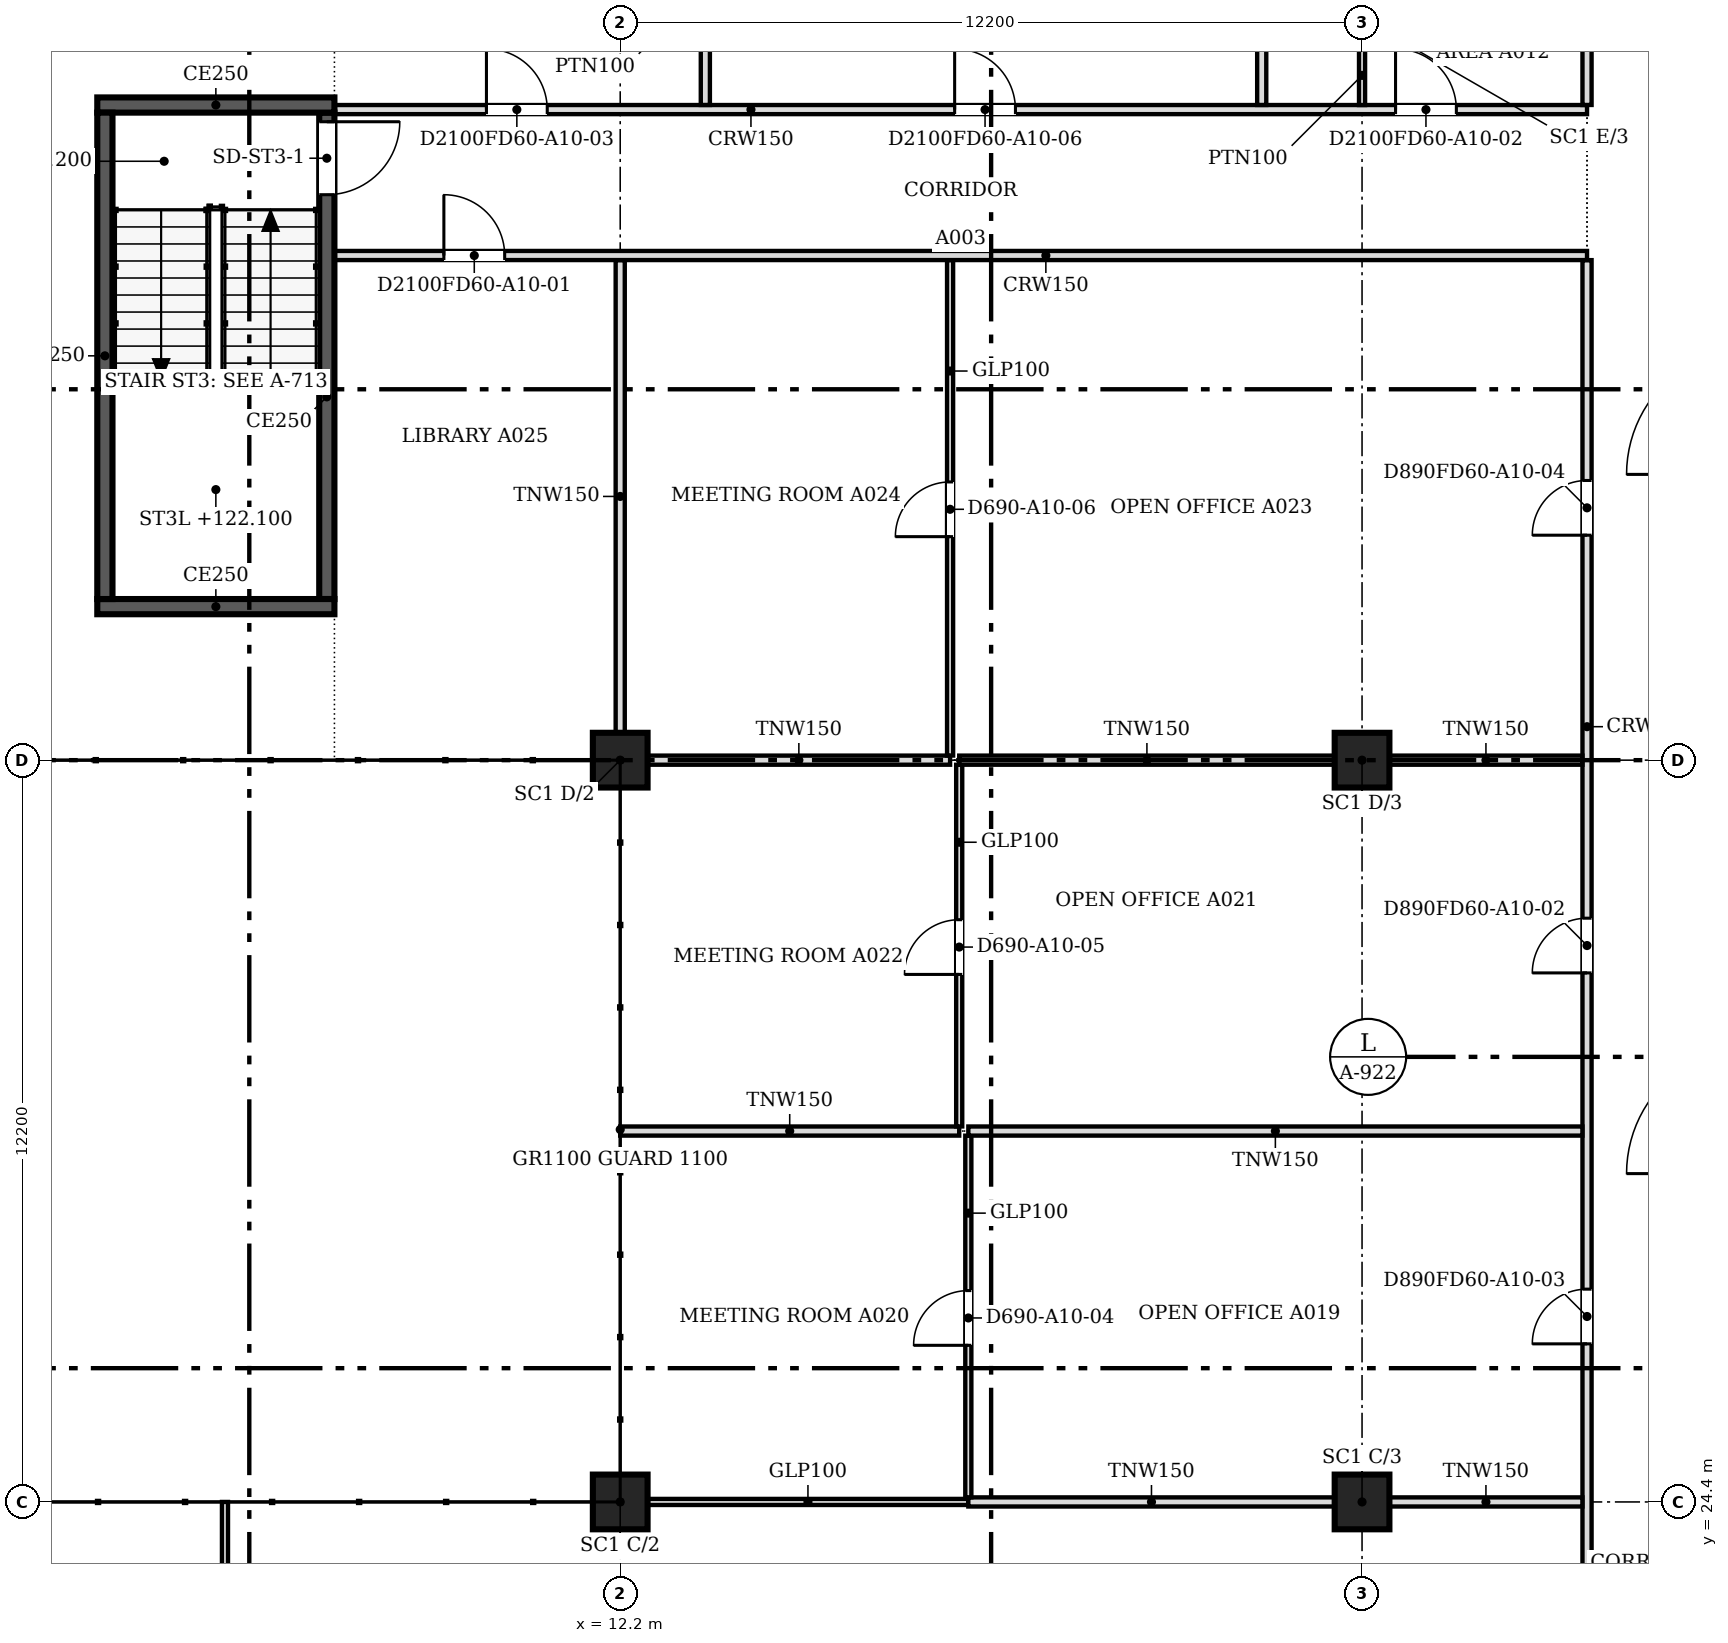
"""IFC4 building model, lengths in metres.
Left out: names, types, materials, properties, quantities, classifications, styles, units other than length and angle.
Written with IfcOpenShell. Run it as: python <this file> out.ifc"""

import sys

from ifc_helpers import new_model, si_unit, direction, frame, frame_2d, origin, origin_2d, place, context, subcontext, project, spatial, rectangle, extrude, source, transform, mapped, element, fill, save


model = new_model("IFC4")
c1 = context("Model", 3, precision=1e-05, world=origin(), true_north=direction((0.0, 1.0)))
c2 = subcontext(c1, "Body", "Model", "MODEL_VIEW")
j1 = project(units=[si_unit("LENGTHUNIT", "METRE"), si_unit("PLANEANGLEUNIT", "RADIAN")], contexts=[c1])
p1 = place(None, origin())
s1 = spatial("IfcSite", under=j1, at=p1, CompositionType="ELEMENT")
p2 = place(p1, origin())
s2 = spatial("IfcBuilding", under=s1, at=p2, CompositionType="ELEMENT")
p3 = place(p2, frame((0.0, 0.0, 120.2)))
s3 = spatial("IfcBuildingStorey", under=s2, at=p3, CompositionType="ELEMENT", Elevation=120.2)
for number, where, z_axis, x_axis in (
    (1, (12.2, 24.4, 0.0), (0.0, 0.0, 1.0), (1.0, 0.0, 0.0)),
    (2, (12.2, 36.6, 0.0), (0.0, 0.0, 1.0), (1.0, 0.0, 0.0)),
    (3, (24.4, 24.4, 0.0), (0.0, 0.0, 1.0), (1.0, 0.0, 0.0)),
    (4, (24.4, 36.6, 0.0), (0.0, 0.0, 1.0), (1.0, 0.0, 0.0)),
):
    element("IfcColumn", number, at=place(p3, frame(where, z_axis=z_axis, x_axis=x_axis)), inside=s3, PredefinedType="COLUMN", context=c2, shape_type="SweptSolid", body=[
        extrude(rectangle(XDim=0.9, YDim=0.9, at=origin_2d()), origin(), (0.0, 0.0, 1.0), 3.6),
    ])
p4 = place(p3, frame((7.5, 39.125, 0.0), z_axis=(0.0, 0.0, 1.0), x_axis=(-1.0, 0.0, 0.0)))
e5 = element("IfcWall", 5, at=p4, inside=s3, PredefinedType="SOLIDWALL", context=c2, shape_type="SweptSolid", body=[
    extrude(rectangle(XDim=3.9, YDim=0.25, at=frame_2d((1.95, 0.0))), origin(), (0.0, 0.0, 1.0), 3.8),
])
p5 = place(p3, frame((3.725, 39.25, 0.0), z_axis=(0.0, 0.0, 1.0), x_axis=(0.0, 1.0, 0.0)))
e6 = element("IfcWall", 6, at=p5, inside=s3, PredefinedType="SOLIDWALL", context=c2, shape_type="SweptSolid", body=[
    extrude(rectangle(XDim=8.0, YDim=0.25, at=frame_2d((4.0, 0.0))), origin(), (0.0, 0.0, 1.0), 3.8),
])
p6 = place(p3, frame((3.6, 47.375, 0.0), z_axis=(0.0, 0.0, 1.0), x_axis=(1.0, 0.0, 0.0)))
e7 = element("IfcWall", 7, at=p6, inside=s3, PredefinedType="SOLIDWALL", context=c2, shape_type="SweptSolid", body=[
    extrude(rectangle(XDim=3.9, YDim=0.25, at=frame_2d((1.95, 0.0))), origin(), (0.0, 0.0, 1.0), 3.8),
])
p7 = place(p3, frame((7.375, 47.25, 0.0), z_axis=(0.0, 0.0, 1.0), x_axis=(0.0, -1.0, 0.0)))
e8 = element("IfcWall", 8, at=p7, inside=s3, PredefinedType="SOLIDWALL", context=c2, shape_type="SweptSolid", body=[
    extrude(rectangle(XDim=8.0, YDim=0.25, at=frame_2d((4.0, 0.0))), origin(), (0.0, 0.0, 1.0), 3.8),
])
m1 = source(origin(), c2, "Body", "SweptSolid", [
    extrude(rectangle(XDim=1.2, YDim=2.1, at=frame_2d((0.6, 1.05))), frame((0.0, 0.135, 0.0), z_axis=(0.0, -1.0, 0.0), x_axis=(1.0, 0.0, 0.0)), (0.0, 0.0, 1.0), 0.27),
])
p8 = place(p7, frame((0.15, 0.0, 0.0)))
e9 = element("IfcOpeningElement", 9, at=p8, cuts=e8, PredefinedType="OPENING", context=c2, shape_type="MappedRepresentation", body=[
    mapped(m1, transform((0.0, 0.0, 0.0), scale=1.0)),
])
p9 = place(p3, frame((28.1, 18.8, 0.0), z_axis=(0.0, 0.0, 1.0), x_axis=(0.0, 1.0, 0.0)))
e10 = element("IfcWall", 10, at=p9, inside=s3, PredefinedType="PARTITIONING", context=c2, shape_type="SweptSolid", body=[
    extrude(rectangle(XDim=26.024, YDim=0.15, at=frame_2d((13.012, 0.0))), origin(), (0.0, 0.0, 1.0), 3.067),
])
m2 = source(origin(), c2, "Body", "SweptSolid", [
    extrude(rectangle(XDim=0.9, YDim=2.1, at=frame_2d((0.45, 1.05))), frame((0.0, 0.085, 0.0), z_axis=(0.0, -1.0, 0.0), x_axis=(1.0, 0.0, 0.0)), (0.0, 0.0, 1.0), 0.17),
])
p10 = place(p9, frame((1.1, 0.0, 0.0)))
e11 = element("IfcOpeningElement", 11, at=p10, cuts=e10, PredefinedType="OPENING", context=c2, shape_type="MappedRepresentation", body=[
    mapped(m2, transform((0.0, 0.0, 0.0), scale=1.0)),
])
p11 = place(p9, frame((14.301, 0.0, 0.0)))
e12 = element("IfcOpeningElement", 12, at=p11, cuts=e10, PredefinedType="OPENING", context=c2, shape_type="MappedRepresentation", body=[
    mapped(m2, transform((0.0, 0.0, 0.0), scale=1.0)),
])
p12 = place(p9, frame((8.2, 0.0, 0.0)))
e13 = element("IfcOpeningElement", 13, at=p12, cuts=e10, PredefinedType="OPENING", context=c2, shape_type="MappedRepresentation", body=[
    mapped(m2, transform((0.0, 0.0, 0.0), scale=1.0)),
])
p13 = place(p9, frame((21.5, 0.0, 0.0)))
e14 = element("IfcOpeningElement", 14, at=p13, cuts=e10, PredefinedType="OPENING", context=c2, shape_type="MappedRepresentation", body=[
    mapped(m2, transform((0.0, 0.0, 0.0), scale=1.0)),
])
p14 = place(p3, frame((5.7, 18.99, 0.0), z_axis=(0.0, 0.0, 1.0), x_axis=(0.0, 1.0, 0.0)))
e15 = element("IfcWall", 15, at=p14, inside=s3, PredefinedType="PARTITIONING", context=c2, shape_type="SweptSolid", body=[
    extrude(rectangle(XDim=5.41, YDim=0.1, at=frame_2d((2.705, 0.0))), origin(), (0.0, 0.0, 1.0), 3.067),
])
m3 = source(origin(), c2, "Body", "SweptSolid", [
    extrude(rectangle(XDim=0.9, YDim=2.1, at=frame_2d((0.45, 1.05))), frame((0.0, 0.06, 0.0), z_axis=(0.0, -1.0, 0.0), x_axis=(1.0, 0.0, 0.0)), (0.0, 0.0, 1.0), 0.12),
])
p15 = place(p14, frame((2.3, 0.0, 0.0)))
e16 = element("IfcOpeningElement", 16, at=p15, cuts=e15, PredefinedType="OPENING", context=c2, shape_type="MappedRepresentation", body=[
    mapped(m3, transform((0.0, 0.0, 0.0), scale=1.0)),
])
p16 = place(p3, frame((12.651, 24.4, 0.0), z_axis=(0.0, 0.0, 1.0), x_axis=(1.0, 0.0, 0.0)))
e17 = element("IfcWall", 17, at=p16, inside=s3, PredefinedType="PARTITIONING", context=c2, shape_type="SweptSolid", body=[
    extrude(rectangle(XDim=5.273, YDim=0.1, at=frame_2d((2.637, 0.0))), origin(), (0.0, 0.0, 1.0), 3.067),
])
p17 = place(p3, frame((17.925, 24.4, 0.0), z_axis=(0.0, 0.0, 1.0), x_axis=(1.0, 0.0, 0.0)))
e18 = element("IfcWall", 18, at=p17, inside=s3, PredefinedType="PARTITIONING", context=c2, shape_type="SweptSolid", body=[
    extrude(rectangle(XDim=6.024, YDim=0.15, at=frame_2d((3.012, 0.0))), origin(), (0.0, 0.0, 1.0), 3.067),
])
p18 = place(p3, frame((24.851, 24.4, 0.0), z_axis=(0.0, 0.0, 1.0), x_axis=(1.0, 0.0, 0.0)))
e19 = element("IfcWall", 19, at=p18, inside=s3, PredefinedType="PARTITIONING", context=c2, shape_type="SweptSolid", body=[
    extrude(rectangle(XDim=3.173, YDim=0.15, at=frame_2d((1.586, 0.0))), origin(), (0.0, 0.0, 1.0), 3.067),
])
p19 = place(p3, frame((17.925, 24.476, 0.0), z_axis=(0.0, 0.0, 1.0), x_axis=(0.0, 1.0, 0.0)))
e20 = element("IfcWall", 20, at=p19, inside=s3, PredefinedType="PARTITIONING", context=c2, shape_type="SweptSolid", body=[
    extrude(rectangle(XDim=5.948, YDim=0.1, at=frame_2d((2.974, 0.0))), origin(), (0.0, 0.0, 1.0), 3.067),
])
p20 = place(p19, frame((2.5, 0.0, 0.0)))
e21 = element("IfcOpeningElement", 21, at=p20, cuts=e20, PredefinedType="OPENING", context=c2, shape_type="MappedRepresentation", body=[
    mapped(m3, transform((0.0, 0.0, 0.0), scale=1.0)),
])
p21 = place(p3, frame((12.2, 30.5, 0.0), z_axis=(0.0, 0.0, 1.0), x_axis=(1.0, 0.0, 0.0)))
e22 = element("IfcWall", 22, at=p21, inside=s3, PredefinedType="PARTITIONING", context=c2, shape_type="SweptSolid", body=[
    extrude(rectangle(XDim=5.575, YDim=0.15, at=frame_2d((2.788, 0.0))), origin(), (0.0, 0.0, 1.0), 3.067),
])
p22 = place(p3, frame((17.925, 30.5, 0.0), z_axis=(0.0, 0.0, 1.0), x_axis=(1.0, 0.0, 0.0)))
e23 = element("IfcWall", 23, at=p22, inside=s3, PredefinedType="PARTITIONING", context=c2, shape_type="SweptSolid", body=[
    extrude(rectangle(XDim=10.099, YDim=0.15, at=frame_2d((5.049, 0.0))), origin(), (0.0, 0.0, 1.0), 3.067),
])
p23 = place(p3, frame((17.775, 30.576, 0.0), z_axis=(0.0, 0.0, 1.0), x_axis=(0.0, 1.0, 0.0)))
e24 = element("IfcWall", 24, at=p23, inside=s3, PredefinedType="PARTITIONING", context=c2, shape_type="SweptSolid", body=[
    extrude(rectangle(XDim=5.948, YDim=0.1, at=frame_2d((2.974, 0.0))), origin(), (0.0, 0.0, 1.0), 3.067),
])
p24 = place(p23, frame((2.5, 0.0, 0.0)))
e25 = element("IfcOpeningElement", 25, at=p24, cuts=e24, PredefinedType="OPENING", context=c2, shape_type="MappedRepresentation", body=[
    mapped(m3, transform((0.0, 0.0, 0.0), scale=1.0)),
])
p25 = place(p3, frame((12.651, 36.6, 0.0), z_axis=(0.0, 0.0, 1.0), x_axis=(1.0, 0.0, 0.0)))
e26 = element("IfcWall", 26, at=p25, inside=s3, PredefinedType="PARTITIONING", context=c2, shape_type="SweptSolid", body=[
    extrude(rectangle(XDim=4.974, YDim=0.15, at=frame_2d((2.487, 0.0))), origin(), (0.0, 0.0, 1.0), 3.067),
])
p26 = place(p3, frame((17.775, 36.6, 0.0), z_axis=(0.0, 0.0, 1.0), x_axis=(1.0, 0.0, 0.0)))
e27 = element("IfcWall", 27, at=p26, inside=s3, PredefinedType="PARTITIONING", context=c2, shape_type="SweptSolid", body=[
    extrude(rectangle(XDim=6.174, YDim=0.15, at=frame_2d((3.087, 0.0))), origin(), (0.0, 0.0, 1.0), 3.067),
])
p27 = place(p3, frame((24.851, 36.6, 0.0), z_axis=(0.0, 0.0, 1.0), x_axis=(1.0, 0.0, 0.0)))
e28 = element("IfcWall", 28, at=p27, inside=s3, PredefinedType="PARTITIONING", context=c2, shape_type="SweptSolid", body=[
    extrude(rectangle(XDim=3.173, YDim=0.15, at=frame_2d((1.586, 0.0))), origin(), (0.0, 0.0, 1.0), 3.067),
])
p28 = place(p3, frame((17.625, 36.676, 0.0), z_axis=(0.0, 0.0, 1.0), x_axis=(0.0, 1.0, 0.0)))
e29 = element("IfcWall", 29, at=p28, inside=s3, PredefinedType="PARTITIONING", context=c2, shape_type="SweptSolid", body=[
    extrude(rectangle(XDim=8.148, YDim=0.1, at=frame_2d((4.074, 0.0))), origin(), (0.0, 0.0, 1.0), 3.067),
])
p29 = place(p28, frame((3.6, 0.0, 0.0)))
e30 = element("IfcOpeningElement", 30, at=p29, cuts=e29, PredefinedType="OPENING", context=c2, shape_type="MappedRepresentation", body=[
    mapped(m3, transform((0.0, 0.0, 0.0), scale=1.0)),
])
p30 = place(p3, frame((12.2, 37.051, 0.0), z_axis=(0.0, 0.0, 1.0), x_axis=(0.0, 1.0, 0.0)))
e31 = element("IfcWall", 31, at=p30, inside=s3, PredefinedType="PARTITIONING", context=c2, shape_type="SweptSolid", body=[
    extrude(rectangle(XDim=7.773, YDim=0.15, at=frame_2d((3.886, 0.0))), origin(), (0.0, 0.0, 1.0), 3.067),
])
p31 = place(p3, frame((28.1, 44.9, 0.0), z_axis=(0.0, 0.0, 1.0), x_axis=(-1.0, 0.0, 0.0)))
e32 = element("IfcWall", 32, at=p31, inside=s3, PredefinedType="PARTITIONING", context=c2, shape_type="SweptSolid", body=[
    extrude(rectangle(XDim=20.6, YDim=0.15, at=frame_2d((10.3, 0.0))), origin(), (0.0, 0.0, 1.0), 3.067),
])
m4 = source(origin(), c2, "Body", "SweptSolid", [
    extrude(rectangle(XDim=1.0, YDim=2.1, at=frame_2d((0.5, 1.05))), frame((0.0, 0.085, 0.0), z_axis=(0.0, -1.0, 0.0), x_axis=(1.0, 0.0, 0.0)), (0.0, 0.0, 1.0), 0.17),
])
p32 = place(p31, frame((17.8, 0.0, 0.0)))
e33 = element("IfcOpeningElement", 33, at=p32, cuts=e32, PredefinedType="OPENING", context=c2, shape_type="MappedRepresentation", body=[
    mapped(m4, transform((0.0, 0.0, 0.0), scale=1.0)),
])
p33 = place(p3, frame((7.5, 47.3, 0.0), z_axis=(0.0, 0.0, 1.0), x_axis=(1.0, 0.0, 0.0)))
e34 = element("IfcWall", 34, at=p33, inside=s3, PredefinedType="PARTITIONING", context=c2, shape_type="SweptSolid", body=[
    extrude(rectangle(XDim=20.6, YDim=0.15, at=frame_2d((10.3, 0.0))), origin(), (0.0, 0.0, 1.0), 3.067),
])
p34 = place(p33, frame((17.451, 0.0, 0.0)))
e35 = element("IfcOpeningElement", 35, at=p34, cuts=e34, PredefinedType="OPENING", context=c2, shape_type="MappedRepresentation", body=[
    mapped(m4, transform((0.0, 0.0, 0.0), scale=1.0)),
])
p35 = place(p33, frame((2.5, 0.0, 0.0)))
e36 = element("IfcOpeningElement", 36, at=p35, cuts=e34, PredefinedType="OPENING", context=c2, shape_type="MappedRepresentation", body=[
    mapped(m4, transform((0.0, 0.0, 0.0), scale=1.0)),
])
p36 = place(p33, frame((10.2, 0.0, 0.0)))
e37 = element("IfcOpeningElement", 37, at=p36, cuts=e34, PredefinedType="OPENING", context=c2, shape_type="MappedRepresentation", body=[
    mapped(m4, transform((0.0, 0.0, 0.0), scale=1.0)),
])
p37 = place(p3, frame((13.6, 47.376, 0.0), z_axis=(0.0, 0.0, 1.0), x_axis=(0.0, 1.0, 0.0)))
e38 = element("IfcWall", 38, at=p37, inside=s3, PredefinedType="PARTITIONING", context=c2, shape_type="SweptSolid", body=[
    extrude(rectangle(XDim=3.498, YDim=0.15, at=frame_2d((1.749, 0.0))), origin(), (0.0, 0.0, 1.0), 3.067),
])
p38 = place(p3, frame((22.75, 47.376, 0.0), z_axis=(0.0, 0.0, 1.0), x_axis=(0.0, 1.0, 0.0)))
e39 = element("IfcWall", 39, at=p38, inside=s3, PredefinedType="PARTITIONING", context=c2, shape_type="SweptSolid", body=[
    extrude(rectangle(XDim=2.948, YDim=0.15, at=frame_2d((1.474, 0.0))), origin(), (0.0, 0.0, 1.0), 3.067),
])
p39 = place(p3, frame((28.1, 47.376, 0.0), z_axis=(0.0, 0.0, 1.0), x_axis=(0.0, 1.0, 0.0)))
e40 = element("IfcWall", 40, at=p39, inside=s3, PredefinedType="PARTITIONING", context=c2, shape_type="SweptSolid", body=[
    extrude(rectangle(XDim=3.748, YDim=0.15, at=frame_2d((1.874, 0.0))), origin(), (0.0, 0.0, 1.0), 3.067),
])
p40 = place(p3, frame((24.4, 48.35, 0.0), z_axis=(0.0, 0.0, 1.0), x_axis=(0.0, -1.0, 0.0)))
e41 = element("IfcWall", 41, at=p40, inside=s3, PredefinedType="PARTITIONING", context=c2, shape_type="SweptSolid", body=[
    extrude(rectangle(XDim=0.975, YDim=0.1, at=frame_2d((0.488, 0.0))), origin(), (0.0, 0.0, 1.0), 3.067),
])
m5 = source(origin(), c2, "Body", "SweptSolid", [
    extrude(rectangle(XDim=1.2, YDim=2.1, at=frame_2d((0.6, 1.05))), frame((0.0, 0.025, 0.0), z_axis=(0.0, -1.0, 0.0), x_axis=(1.0, 0.0, 0.0)), (0.0, 0.0, 1.0), 0.05),
])
p41 = place(p8, origin())
e42 = element("IfcDoor", 42, at=p41, inside=s3, OperationType="SINGLE_SWING_LEFT", PredefinedType="DOOR", context=c2, shape_type="MappedRepresentation", body=[
    mapped(m5, transform((0.0, 0.0, 0.0), scale=1.0)),
])
fill(e9, e42)
m6 = source(origin(), c2, "Body", "SweptSolid", [
    extrude(rectangle(XDim=1.0, YDim=2.1, at=frame_2d((0.5, 1.05))), frame((0.0, 0.025, 0.0), z_axis=(0.0, -1.0, 0.0), x_axis=(1.0, 0.0, 0.0)), (0.0, 0.0, 1.0), 0.05),
])
p42 = place(p32, origin())
e43 = element("IfcDoor", 43, at=p42, inside=s3, OperationType="SINGLE_SWING_RIGHT", PredefinedType="DOOR", context=c2, shape_type="MappedRepresentation", body=[
    mapped(m6, transform((0.0, 0.0, 0.0), scale=1.0)),
])
fill(e33, e43)
p43 = place(p34, origin())
e44 = element("IfcDoor", 44, at=p43, inside=s3, OperationType="SINGLE_SWING_LEFT", PredefinedType="DOOR", context=c2, shape_type="MappedRepresentation", body=[
    mapped(m6, transform((0.0, 0.0, 0.0), scale=1.0)),
])
fill(e35, e44)
m7 = source(origin(), c2, "Body", "SweptSolid", [
    extrude(rectangle(XDim=0.9, YDim=2.1, at=frame_2d((0.45, 1.05))), frame((0.0, 0.025, 0.0), z_axis=(0.0, -1.0, 0.0), x_axis=(1.0, 0.0, 0.0)), (0.0, 0.0, 1.0), 0.05),
])
p44 = place(p20, origin())
e45 = element("IfcDoor", 45, at=p44, inside=s3, OperationType="SINGLE_SWING_LEFT", PredefinedType="DOOR", context=c2, shape_type="MappedRepresentation", body=[
    mapped(m7, transform((0.0, 0.0, 0.0), scale=1.0)),
])
fill(e21, e45)
p45 = place(p24, origin())
e46 = element("IfcDoor", 46, at=p45, inside=s3, OperationType="SINGLE_SWING_LEFT", PredefinedType="DOOR", context=c2, shape_type="MappedRepresentation", body=[
    mapped(m7, transform((0.0, 0.0, 0.0), scale=1.0)),
])
fill(e25, e46)
p46 = place(p11, origin())
e47 = element("IfcDoor", 47, at=p46, inside=s3, OperationType="SINGLE_SWING_LEFT", PredefinedType="DOOR", context=c2, shape_type="MappedRepresentation", body=[
    mapped(m7, transform((0.0, 0.0, 0.0), scale=1.0)),
])
fill(e12, e47)
p47 = place(p35, origin())
e48 = element("IfcDoor", 48, at=p47, inside=s3, OperationType="SINGLE_SWING_LEFT", PredefinedType="DOOR", context=c2, shape_type="MappedRepresentation", body=[
    mapped(m6, transform((0.0, 0.0, 0.0), scale=1.0)),
])
fill(e36, e48)
p48 = place(p12, origin())
e49 = element("IfcDoor", 49, at=p48, inside=s3, OperationType="SINGLE_SWING_LEFT", PredefinedType="DOOR", context=c2, shape_type="MappedRepresentation", body=[
    mapped(m7, transform((0.0, 0.0, 0.0), scale=1.0)),
])
fill(e13, e49)
p49 = place(p29, origin())
e50 = element("IfcDoor", 50, at=p49, inside=s3, OperationType="SINGLE_SWING_LEFT", PredefinedType="DOOR", context=c2, shape_type="MappedRepresentation", body=[
    mapped(m7, transform((0.0, 0.0, 0.0), scale=1.0)),
])
fill(e30, e50)
p50 = place(p13, origin())
e51 = element("IfcDoor", 51, at=p50, inside=s3, OperationType="SINGLE_SWING_LEFT", PredefinedType="DOOR", context=c2, shape_type="MappedRepresentation", body=[
    mapped(m7, transform((0.0, 0.0, 0.0), scale=1.0)),
])
fill(e14, e51)
p51 = place(p36, origin())
e52 = element("IfcDoor", 52, at=p51, inside=s3, OperationType="SINGLE_SWING_LEFT", PredefinedType="DOOR", context=c2, shape_type="MappedRepresentation", body=[
    mapped(m6, transform((0.0, 0.0, 0.0), scale=1.0)),
])
fill(e37, e52)
save(model, sys.argv[1])
